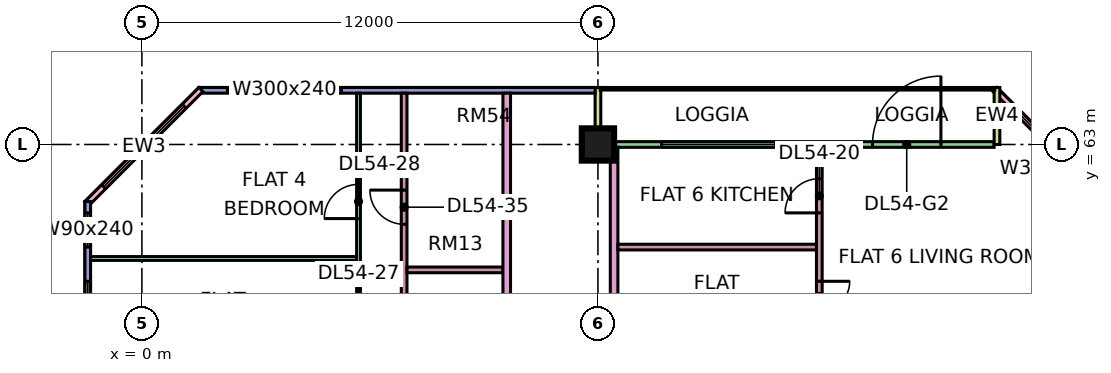
"""IFC4 building model, lengths in metres.
Left out: names, types, materials, properties, quantities, classifications, styles, units other than length and angle.
Written with IfcOpenShell. Run it as: python <this file> out.ifc"""

import sys

from ifc_helpers import new_model, si_unit, direction, frame, frame_2d, origin, origin_2d, place, context, subcontext, project, spatial, rectangle, extrude, element, fill, save


model = new_model("IFC4")
c1 = context("Model", 3, precision=1e-05, world=origin(), true_north=direction((0.0, 1.0)))
c2 = subcontext(c1, "Body", "Model", "MODEL_VIEW")
j1 = project(units=[si_unit("LENGTHUNIT", "METRE"), si_unit("PLANEANGLEUNIT", "RADIAN")], contexts=[c1])
p1 = place(None, origin())
s1 = spatial("IfcSite", under=j1, at=p1, CompositionType="ELEMENT")
p2 = place(p1, origin())
s2 = spatial("IfcBuilding", under=s1, at=p2, CompositionType="ELEMENT")
p3 = place(p2, frame((0.0, 0.0, 230.4)))
s3 = spatial("IfcBuildingStorey", under=s2, at=p3, CompositionType="ELEMENT", Elevation=230.4)
p4 = place(p3, frame((12.0, 63.0, 0.0), z_axis=(0.0, 0.0, 1.0), x_axis=(1.0, 0.0, 0.0)))
e1 = element("IfcColumn", 1, at=p4, inside=s3, PredefinedType="COLUMN", context=c2, shape_type="SweptSolid", body=[
    extrude(rectangle(XDim=0.85, YDim=0.85, at=origin_2d()), origin(), (0.0, 0.0, 1.0), 3.75),
])
p5 = place(p3, frame((25.447, 61.447, 0.0), z_axis=(0.0, 0.0, 1.0), x_axis=(-0.707106781187, 0.707106781187, 0.0)))
e2 = element("IfcWall", 2, at=p5, inside=s3, PredefinedType="SOLIDWALL", context=c2, shape_type="SweptSolid", body=[
    extrude(rectangle(XDim=4.243, YDim=0.15, at=frame_2d((2.121, 0.0))), origin(), (0.0, 0.0, 1.0), 3.35),
])
p6 = place(p5, frame((0.621, 0.0, 0.45)))
e3 = element("IfcOpeningElement", 3, at=p6, cuts=e2, PredefinedType="OPENING", context=c2, shape_type="SweptSolid", body=[
    extrude(rectangle(XDim=3.0, YDim=2.4, at=frame_2d((1.5, 1.2))), frame((0.0, 0.085, 0.0), z_axis=(0.0, -1.0, 0.0), x_axis=(1.0, 0.0, 0.0)), (0.0, 0.0, 1.0), 0.17),
])
p7 = place(p3, frame((22.425, 63.0, 0.0), z_axis=(0.0, 0.0, 1.0), x_axis=(-1.0, 0.0, 0.0)))
e4 = element("IfcWall", 4, at=p7, inside=s3, PredefinedType="SOLIDWALL", context=c2, shape_type="SweptSolid", body=[
    extrude(rectangle(XDim=10.35, YDim=0.15, at=frame_2d((5.175, 0.0))), origin(), (0.0, 0.0, 1.0), 3.35),
])
p8 = place(p7, frame((1.4, 0.0, 0.0)))
e5 = element("IfcOpeningElement", 5, at=p8, cuts=e4, PredefinedType="OPENING", context=c2, shape_type="SweptSolid", body=[
    extrude(rectangle(XDim=1.8, YDim=2.4, at=frame_2d((0.9, 1.2))), frame((0.0, 0.085, 0.0), z_axis=(0.0, -1.0, 0.0), x_axis=(1.0, 0.0, 0.0)), (0.0, 0.0, 1.0), 0.17),
])
p9 = place(p7, frame((5.75, 0.0, 0.45)))
e6 = element("IfcOpeningElement", 6, at=p9, cuts=e4, PredefinedType="OPENING", context=c2, shape_type="SweptSolid", body=[
    extrude(rectangle(XDim=3.0, YDim=2.4, at=frame_2d((1.5, 1.2))), frame((0.0, 0.085, 0.0), z_axis=(0.0, -1.0, 0.0), x_axis=(1.0, 0.0, 0.0)), (0.0, 0.0, 1.0), 0.17),
])
for number, where, z_axis, x_axis in (
    (7, (22.5, 64.5, 0.0), (0.0, 0.0, 1.0), (0.0, -1.0, 0.0)),
    (8, (12.0, 64.5, 0.0), (0.0, 0.0, 1.0), (0.0, -1.0, 0.0)),
):
    element("IfcWall", number, at=place(p3, frame(where, z_axis=z_axis, x_axis=x_axis)), inside=s3, PredefinedType="SOLIDWALL", context=c2, shape_type="SweptSolid", body=[
        extrude(rectangle(XDim=1.5, YDim=0.15, at=frame_2d((0.75, 0.0))), origin(), (0.0, 0.0, 1.0), 3.35),
    ])
p10 = place(p3, frame((11.925, 64.425, 0.0), z_axis=(0.0, 0.0, 1.0), x_axis=(-1.0, 0.0, 0.0)))
e9 = element("IfcWall", 9, at=p10, inside=s3, PredefinedType="SOLIDWALL", context=c2, shape_type="SweptSolid", body=[
    extrude(rectangle(XDim=10.425, YDim=0.15, at=frame_2d((5.212, 0.0))), origin(), (0.0, 0.0, 1.0), 3.35),
])
p11 = place(p10, frame((6.675, 0.0, 0.45)))
e10 = element("IfcOpeningElement", 10, at=p11, cuts=e9, PredefinedType="OPENING", context=c2, shape_type="SweptSolid", body=[
    extrude(rectangle(XDim=3.0, YDim=2.4, at=frame_2d((1.5, 1.2))), frame((0.0, 0.085, 0.0), z_axis=(0.0, -1.0, 0.0), x_axis=(1.0, 0.0, 0.0)), (0.0, 0.0, 1.0), 0.17),
])
p12 = place(p3, frame((1.553, 64.447, 0.0), z_axis=(0.0, 0.0, 1.0), x_axis=(-0.707106781187, -0.707106781187, 0.0)))
e11 = element("IfcWall", 11, at=p12, inside=s3, PredefinedType="SOLIDWALL", context=c2, shape_type="SweptSolid", body=[
    extrude(rectangle(XDim=4.243, YDim=0.15, at=frame_2d((2.121, 0.0))), origin(), (0.0, 0.0, 1.0), 3.35),
])
p13 = place(p12, frame((0.621, 0.0, 0.45)))
e12 = element("IfcOpeningElement", 12, at=p13, cuts=e11, PredefinedType="OPENING", context=c2, shape_type="SweptSolid", body=[
    extrude(rectangle(XDim=3.0, YDim=2.4, at=frame_2d((1.5, 1.2))), frame((0.0, 0.085, 0.0), z_axis=(0.0, -1.0, 0.0), x_axis=(1.0, 0.0, 0.0)), (0.0, 0.0, 1.0), 0.17),
])
p14 = place(p3, frame((-1.425, 61.5, 0.0), z_axis=(0.0, 0.0, 1.0), x_axis=(0.0, -1.0, 0.0)))
e13 = element("IfcWall", 13, at=p14, inside=s3, PredefinedType="SOLIDWALL", context=c2, shape_type="SweptSolid", body=[
    extrude(rectangle(XDim=13.425, YDim=0.15, at=frame_2d((6.712, 0.0))), origin(), (0.0, 0.0, 1.0), 3.35),
])
p15 = place(p14, frame((0.3, 0.0, 0.45)))
e14 = element("IfcOpeningElement", 14, at=p15, cuts=e13, PredefinedType="OPENING", context=c2, shape_type="SweptSolid", body=[
    extrude(rectangle(XDim=0.9, YDim=2.4, at=frame_2d((0.45, 1.2))), frame((0.0, 0.085, 0.0), z_axis=(0.0, -1.0, 0.0), x_axis=(1.0, 0.0, 0.0)), (0.0, 0.0, 1.0), 0.17),
])
p16 = place(p14, frame((2.1, 0.0, 0.45)))
e15 = element("IfcOpeningElement", 15, at=p16, cuts=e13, PredefinedType="OPENING", context=c2, shape_type="SweptSolid", body=[
    extrude(rectangle(XDim=1.8, YDim=2.4, at=frame_2d((0.9, 1.2))), frame((0.0, 0.085, 0.0), z_axis=(0.0, -1.0, 0.0), x_axis=(1.0, 0.0, 0.0)), (0.0, 0.0, 1.0), 0.17),
])
p17 = place(p14, frame((5.1, 0.0, 0.45)))
e16 = element("IfcOpeningElement", 16, at=p17, cuts=e13, PredefinedType="OPENING", context=c2, shape_type="SweptSolid", body=[
    extrude(rectangle(XDim=1.8, YDim=2.4, at=frame_2d((0.9, 1.2))), frame((0.0, 0.085, 0.0), z_axis=(0.0, -1.0, 0.0), x_axis=(1.0, 0.0, 0.0)), (0.0, 0.0, 1.0), 0.17),
])
p18 = place(p14, frame((8.962, 0.0, 0.45)))
e17 = element("IfcOpeningElement", 17, at=p18, cuts=e13, PredefinedType="OPENING", context=c2, shape_type="SweptSolid", body=[
    extrude(rectangle(XDim=3.0, YDim=2.4, at=frame_2d((1.5, 1.2))), frame((0.0, 0.085, 0.0), z_axis=(0.0, -1.0, 0.0), x_axis=(1.0, 0.0, 0.0)), (0.0, 0.0, 1.0), 0.17),
])
p19 = place(p3, frame((-1.351, 60.0, 0.0), z_axis=(0.0, 0.0, 1.0), x_axis=(1.0, 0.0, 0.0)))
e18 = element("IfcWall", 18, at=p19, inside=s3, PredefinedType="PARTITIONING", context=c2, shape_type="SweptSolid", body=[
    extrude(rectangle(XDim=7.001, YDim=0.1, at=frame_2d((3.5, 0.0))), origin(), (0.0, 0.0, 1.0), 3.35),
])
p20 = place(p3, frame((5.7, 36.1, 0.0), z_axis=(0.0, 0.0, 1.0), x_axis=(0.0, 1.0, 0.0)))
e19 = element("IfcWall", 19, at=p20, inside=s3, PredefinedType="PARTITIONING", context=c2, shape_type="SweptSolid", body=[
    extrude(rectangle(XDim=28.25, YDim=0.1, at=frame_2d((14.125, 0.0))), origin(), (0.0, 0.0, 1.0), 3.35),
])
p21 = place(p20, frame((0.95, 0.0, 0.0)))
e20 = element("IfcOpeningElement", 20, at=p21, cuts=e19, PredefinedType="OPENING", context=c2, shape_type="SweptSolid", body=[
    extrude(rectangle(XDim=0.9, YDim=2.1, at=frame_2d((0.45, 1.05))), frame((0.0, 0.06, 0.0), z_axis=(0.0, -1.0, 0.0), x_axis=(1.0, 0.0, 0.0)), (0.0, 0.0, 1.0), 0.12),
])
p22 = place(p20, frame((3.95, 0.0, 0.0)))
e21 = element("IfcOpeningElement", 21, at=p22, cuts=e19, PredefinedType="OPENING", context=c2, shape_type="SweptSolid", body=[
    extrude(rectangle(XDim=0.9, YDim=2.1, at=frame_2d((0.45, 1.05))), frame((0.0, 0.06, 0.0), z_axis=(0.0, -1.0, 0.0), x_axis=(1.0, 0.0, 0.0)), (0.0, 0.0, 1.0), 0.12),
])
p23 = place(p20, frame((6.95, 0.0, 0.0)))
e22 = element("IfcOpeningElement", 22, at=p23, cuts=e19, PredefinedType="OPENING", context=c2, shape_type="SweptSolid", body=[
    extrude(rectangle(XDim=0.9, YDim=2.1, at=frame_2d((0.45, 1.05))), frame((0.0, 0.06, 0.0), z_axis=(0.0, -1.0, 0.0), x_axis=(1.0, 0.0, 0.0)), (0.0, 0.0, 1.0), 0.12),
])
p24 = place(p20, frame((18.95, 0.0, 0.0)))
e23 = element("IfcOpeningElement", 23, at=p24, cuts=e19, PredefinedType="OPENING", context=c2, shape_type="SweptSolid", body=[
    extrude(rectangle(XDim=0.9, YDim=2.1, at=frame_2d((0.45, 1.05))), frame((0.0, 0.06, 0.0), z_axis=(0.0, -1.0, 0.0), x_axis=(1.0, 0.0, 0.0)), (0.0, 0.0, 1.0), 0.12),
])
p25 = place(p20, frame((21.95, 0.0, 0.0)))
e24 = element("IfcOpeningElement", 24, at=p25, cuts=e19, PredefinedType="OPENING", context=c2, shape_type="SweptSolid", body=[
    extrude(rectangle(XDim=0.9, YDim=2.1, at=frame_2d((0.45, 1.05))), frame((0.0, 0.06, 0.0), z_axis=(0.0, -1.0, 0.0), x_axis=(1.0, 0.0, 0.0)), (0.0, 0.0, 1.0), 0.12),
])
p26 = place(p20, frame((24.95, 0.0, 0.0)))
e25 = element("IfcOpeningElement", 25, at=p26, cuts=e19, PredefinedType="OPENING", context=c2, shape_type="SweptSolid", body=[
    extrude(rectangle(XDim=0.9, YDim=2.1, at=frame_2d((0.45, 1.05))), frame((0.0, 0.06, 0.0), z_axis=(0.0, -1.0, 0.0), x_axis=(1.0, 0.0, 0.0)), (0.0, 0.0, 1.0), 0.12),
])
p27 = place(p20, frame((12.95, 0.0, 0.0)))
e26 = element("IfcOpeningElement", 26, at=p27, cuts=e19, PredefinedType="OPENING", context=c2, shape_type="SweptSolid", body=[
    extrude(rectangle(XDim=0.9, YDim=2.1, at=frame_2d((0.45, 1.05))), frame((0.0, 0.06, 0.0), z_axis=(0.0, -1.0, 0.0), x_axis=(1.0, 0.0, 0.0)), (0.0, 0.0, 1.0), 0.12),
])
p28 = place(p3, frame((6.9, 39.25, 0.0), z_axis=(0.0, 0.0, 1.0), x_axis=(0.0, 1.0, 0.0)))
e27 = element("IfcWall", 27, at=p28, inside=s3, PredefinedType="PARTITIONING", context=c2, shape_type="SweptSolid", body=[
    extrude(rectangle(XDim=25.1, YDim=0.15, at=frame_2d((12.55, 0.0))), origin(), (0.0, 0.0, 1.0), 3.35),
])
p29 = place(p28, frame((9.5, 0.0, 0.0)))
e28 = element("IfcOpeningElement", 28, at=p29, cuts=e27, PredefinedType="OPENING", context=c2, shape_type="SweptSolid", body=[
    extrude(rectangle(XDim=0.8, YDim=2.1, at=frame_2d((0.4, 1.05))), frame((0.0, 0.085, 0.0), z_axis=(0.0, -1.0, 0.0), x_axis=(1.0, 0.0, 0.0)), (0.0, 0.0, 1.0), 0.17),
])
p30 = place(p28, frame((12.65, 0.0, 0.0)))
e29 = element("IfcOpeningElement", 29, at=p30, cuts=e27, PredefinedType="OPENING", context=c2, shape_type="SweptSolid", body=[
    extrude(rectangle(XDim=0.9, YDim=2.1, at=frame_2d((0.45, 1.05))), frame((0.0, 0.085, 0.0), z_axis=(0.0, -1.0, 0.0), x_axis=(1.0, 0.0, 0.0)), (0.0, 0.0, 1.0), 0.17),
])
p31 = place(p28, frame((18.8, 0.0, 0.0)))
e30 = element("IfcOpeningElement", 30, at=p31, cuts=e27, PredefinedType="OPENING", context=c2, shape_type="SweptSolid", body=[
    extrude(rectangle(XDim=0.8, YDim=2.1, at=frame_2d((0.4, 1.05))), frame((0.0, 0.085, 0.0), z_axis=(0.0, -1.0, 0.0), x_axis=(1.0, 0.0, 0.0)), (0.0, 0.0, 1.0), 0.17),
])
p32 = place(p28, frame((6.8, 0.0, 0.0)))
e31 = element("IfcOpeningElement", 31, at=p32, cuts=e27, PredefinedType="OPENING", context=c2, shape_type="SweptSolid", body=[
    extrude(rectangle(XDim=0.9, YDim=2.1, at=frame_2d((0.45, 1.05))), frame((0.0, 0.085, 0.0), z_axis=(0.0, -1.0, 0.0), x_axis=(1.0, 0.0, 0.0)), (0.0, 0.0, 1.0), 0.17),
])
p33 = place(p28, frame((21.65, 0.0, 0.0)))
e32 = element("IfcOpeningElement", 32, at=p33, cuts=e27, PredefinedType="OPENING", context=c2, shape_type="SweptSolid", body=[
    extrude(rectangle(XDim=0.9, YDim=2.1, at=frame_2d((0.45, 1.05))), frame((0.0, 0.085, 0.0), z_axis=(0.0, -1.0, 0.0), x_axis=(1.0, 0.0, 0.0)), (0.0, 0.0, 1.0), 0.17),
])
p34 = place(p28, frame((3.95, 0.0, 0.0)))
e33 = element("IfcOpeningElement", 33, at=p34, cuts=e27, PredefinedType="OPENING", context=c2, shape_type="SweptSolid", body=[
    extrude(rectangle(XDim=0.8, YDim=2.1, at=frame_2d((0.4, 1.05))), frame((0.0, 0.085, 0.0), z_axis=(0.0, -1.0, 0.0), x_axis=(1.0, 0.0, 0.0)), (0.0, 0.0, 1.0), 0.17),
])
p35 = place(p28, frame((15.8, 0.0, 0.0)))
e34 = element("IfcOpeningElement", 34, at=p35, cuts=e27, PredefinedType="OPENING", context=c2, shape_type="SweptSolid", body=[
    extrude(rectangle(XDim=0.8, YDim=2.1, at=frame_2d((0.4, 1.05))), frame((0.0, 0.085, 0.0), z_axis=(0.0, -1.0, 0.0), x_axis=(1.0, 0.0, 0.0)), (0.0, 0.0, 1.0), 0.17),
])
p36 = place(p3, frame((6.975, 59.7, 0.0), z_axis=(0.0, 0.0, 1.0), x_axis=(1.0, 0.0, 0.0)))
e35 = element("IfcWall", 35, at=p36, inside=s3, PredefinedType="PARTITIONING", context=c2, shape_type="SweptSolid", body=[
    extrude(rectangle(XDim=2.525, YDim=0.15, at=frame_2d((1.262, 0.0))), origin(), (0.0, 0.0, 1.0), 3.35),
])
p37 = place(p3, frame((9.6, 20.0, 0.0), z_axis=(0.0, 0.0, 1.0), x_axis=(0.0, 1.0, 0.0)))
e36 = element("IfcWall", 36, at=p37, inside=s3, PredefinedType="PARTITIONING", context=c2, shape_type="SweptSolid", body=[
    extrude(rectangle(XDim=44.35, YDim=0.2, at=frame_2d((22.175, 0.0))), origin(), (0.0, 0.0, 1.0), 3.35),
])
p38 = place(p37, frame((17.1, 0.0, 0.0)))
e37 = element("IfcOpeningElement", 37, at=p38, cuts=e36, PredefinedType="OPENING", context=c2, shape_type="SweptSolid", body=[
    extrude(rectangle(XDim=1.0, YDim=2.1, at=frame_2d((0.5, 1.05))), frame((0.0, 0.11, 0.0), z_axis=(0.0, -1.0, 0.0), x_axis=(1.0, 0.0, 0.0)), (0.0, 0.0, 1.0), 0.22),
])
p39 = place(p37, frame((0.6, 0.0, 0.0)))
e38 = element("IfcOpeningElement", 38, at=p39, cuts=e36, PredefinedType="OPENING", context=c2, shape_type="SweptSolid", body=[
    extrude(rectangle(XDim=1.2, YDim=2.1, at=frame_2d((0.6, 1.05))), frame((0.0, 0.11, 0.0), z_axis=(0.0, -1.0, 0.0), x_axis=(1.0, 0.0, 0.0)), (0.0, 0.0, 1.0), 0.22),
])
p40 = place(p37, frame((3.9, 0.0, 0.0)))
e39 = element("IfcOpeningElement", 39, at=p40, cuts=e36, PredefinedType="OPENING", context=c2, shape_type="SweptSolid", body=[
    extrude(rectangle(XDim=1.0, YDim=2.1, at=frame_2d((0.5, 1.05))), frame((0.0, 0.11, 0.0), z_axis=(0.0, -1.0, 0.0), x_axis=(1.0, 0.0, 0.0)), (0.0, 0.0, 1.0), 0.22),
])
p41 = place(p3, frame((12.425, 20.0, 0.0), z_axis=(0.0, 0.0, 1.0), x_axis=(0.0, 1.0, 0.0)))
e40 = element("IfcWall", 40, at=p41, inside=s3, PredefinedType="PARTITIONING", context=c2, shape_type="SweptSolid", body=[
    extrude(rectangle(XDim=42.926, YDim=0.2, at=frame_2d((21.463, 0.0))), origin(), (0.0, 0.0, 1.0), 3.35),
])
p42 = place(p41, frame((6.7, 0.0, 0.0)))
e41 = element("IfcOpeningElement", 41, at=p42, cuts=e40, PredefinedType="OPENING", context=c2, shape_type="SweptSolid", body=[
    extrude(rectangle(XDim=1.6, YDim=2.1, at=frame_2d((0.8, 1.05))), frame((0.0, 0.11, 0.0), z_axis=(0.0, -1.0, 0.0), x_axis=(1.0, 0.0, 0.0)), (0.0, 0.0, 1.0), 0.22),
])
p43 = place(p41, frame((12.95, 0.0, 0.0)))
e42 = element("IfcOpeningElement", 42, at=p43, cuts=e40, PredefinedType="OPENING", context=c2, shape_type="SweptSolid", body=[
    extrude(rectangle(XDim=1.0, YDim=2.1, at=frame_2d((0.5, 1.05))), frame((0.0, 0.11, 0.0), z_axis=(0.0, -1.0, 0.0), x_axis=(1.0, 0.0, 0.0)), (0.0, 0.0, 1.0), 0.22),
])
p44 = place(p41, frame((23.2, 0.0, 0.0)))
e43 = element("IfcOpeningElement", 43, at=p44, cuts=e40, PredefinedType="OPENING", context=c2, shape_type="SweptSolid", body=[
    extrude(rectangle(XDim=1.0, YDim=2.1, at=frame_2d((0.5, 1.05))), frame((0.0, 0.11, 0.0), z_axis=(0.0, -1.0, 0.0), x_axis=(1.0, 0.0, 0.0)), (0.0, 0.0, 1.0), 0.22),
])
p45 = place(p41, frame((35.35, 0.0, 0.0)))
e44 = element("IfcOpeningElement", 44, at=p45, cuts=e40, PredefinedType="OPENING", context=c2, shape_type="SweptSolid", body=[
    extrude(rectangle(XDim=1.0, YDim=2.1, at=frame_2d((0.5, 1.05))), frame((0.0, 0.11, 0.0), z_axis=(0.0, -1.0, 0.0), x_axis=(1.0, 0.0, 0.0)), (0.0, 0.0, 1.0), 0.22),
])
p46 = place(p41, frame((1.15, 0.0, 0.0)))
e45 = element("IfcOpeningElement", 45, at=p46, cuts=e40, PredefinedType="OPENING", context=c2, shape_type="SweptSolid", body=[
    extrude(rectangle(XDim=1.8, YDim=2.1, at=frame_2d((0.9, 1.05))), frame((0.0, 0.11, 0.0), z_axis=(0.0, -1.0, 0.0), x_axis=(1.0, 0.0, 0.0)), (0.0, 0.0, 1.0), 0.22),
])
p47 = place(p41, frame((28.6, 0.0, 0.0)))
e46 = element("IfcOpeningElement", 46, at=p47, cuts=e40, PredefinedType="OPENING", context=c2, shape_type="SweptSolid", body=[
    extrude(rectangle(XDim=1.8, YDim=2.1, at=frame_2d((0.9, 1.05))), frame((0.0, 0.11, 0.0), z_axis=(0.0, -1.0, 0.0), x_axis=(1.0, 0.0, 0.0)), (0.0, 0.0, 1.0), 0.22),
])
p48 = place(p3, frame((12.525, 60.3, 0.0), z_axis=(0.0, 0.0, 1.0), x_axis=(1.0, 0.0, 0.0)))
e47 = element("IfcWall", 47, at=p48, inside=s3, PredefinedType="PARTITIONING", context=c2, shape_type="SweptSolid", body=[
    extrude(rectangle(XDim=5.225, YDim=0.15, at=frame_2d((2.613, 0.0))), origin(), (0.0, 0.0, 1.0), 3.35),
])
p49 = place(p3, frame((17.825, 57.675, 0.0), z_axis=(0.0, 0.0, 1.0), x_axis=(0.0, 1.0, 0.0)))
e48 = element("IfcWall", 48, at=p49, inside=s3, PredefinedType="PARTITIONING", context=c2, shape_type="SweptSolid", body=[
    extrude(rectangle(XDim=5.251, YDim=0.15, at=frame_2d((2.625, 0.0))), origin(), (0.0, 0.0, 1.0), 3.35),
])
p50 = place(p49, frame((0.925, 0.0, 0.0)))
e49 = element("IfcOpeningElement", 49, at=p50, cuts=e48, PredefinedType="OPENING", context=c2, shape_type="SweptSolid", body=[
    extrude(rectangle(XDim=0.8, YDim=2.1, at=frame_2d((0.4, 1.05))), frame((0.0, 0.085, 0.0), z_axis=(0.0, -1.0, 0.0), x_axis=(1.0, 0.0, 0.0)), (0.0, 0.0, 1.0), 0.17),
])
p51 = place(p49, frame((3.525, 0.0, 0.0)))
e50 = element("IfcOpeningElement", 50, at=p51, cuts=e48, PredefinedType="OPENING", context=c2, shape_type="SweptSolid", body=[
    extrude(rectangle(XDim=0.9, YDim=2.1, at=frame_2d((0.45, 1.05))), frame((0.0, 0.085, 0.0), z_axis=(0.0, -1.0, 0.0), x_axis=(1.0, 0.0, 0.0)), (0.0, 0.0, 1.0), 0.17),
])
p52 = place(p6, origin())
e51 = element("IfcWindow", 51, at=p52, inside=s3, PartitioningType="SINGLE_PANEL", PredefinedType="WINDOW", context=c2, shape_type="SweptSolid", body=[
    extrude(rectangle(XDim=3.0, YDim=2.4, at=frame_2d((1.5, 1.2))), frame((0.0, 0.03, 0.0), z_axis=(0.0, -1.0, 0.0), x_axis=(1.0, 0.0, 0.0)), (0.0, 0.0, 1.0), 0.06),
])
fill(e3, e51)
p53 = place(p8, frame((1.8, 0.0, 0.0), z_axis=(0.0, 0.0, 1.0), x_axis=(-1.0, 0.0, 0.0)))
e52 = element("IfcDoor", 52, at=p53, inside=s3, OperationType="DOUBLE_DOOR_SINGLE_SWING", PredefinedType="DOOR", context=c2, shape_type="SweptSolid", body=[
    extrude(rectangle(XDim=1.8, YDim=2.4, at=frame_2d((0.9, 1.2))), frame((0.0, 0.025, 0.0), z_axis=(0.0, -1.0, 0.0), x_axis=(1.0, 0.0, 0.0)), (0.0, 0.0, 1.0), 0.05),
])
fill(e5, e52)
p54 = place(p9, origin())
e53 = element("IfcWindow", 53, at=p54, inside=s3, PartitioningType="SINGLE_PANEL", PredefinedType="WINDOW", context=c2, shape_type="SweptSolid", body=[
    extrude(rectangle(XDim=3.0, YDim=2.4, at=frame_2d((1.5, 1.2))), frame((0.0, 0.03, 0.0), z_axis=(0.0, -1.0, 0.0), x_axis=(1.0, 0.0, 0.0)), (0.0, 0.0, 1.0), 0.06),
])
fill(e6, e53)
p55 = place(p11, origin())
e54 = element("IfcWindow", 54, at=p55, inside=s3, PartitioningType="SINGLE_PANEL", PredefinedType="WINDOW", context=c2, shape_type="SweptSolid", body=[
    extrude(rectangle(XDim=3.0, YDim=2.4, at=frame_2d((1.5, 1.2))), frame((0.0, 0.03, 0.0), z_axis=(0.0, -1.0, 0.0), x_axis=(1.0, 0.0, 0.0)), (0.0, 0.0, 1.0), 0.06),
])
fill(e10, e54)
p56 = place(p13, origin())
e55 = element("IfcWindow", 55, at=p56, inside=s3, PartitioningType="SINGLE_PANEL", PredefinedType="WINDOW", context=c2, shape_type="SweptSolid", body=[
    extrude(rectangle(XDim=3.0, YDim=2.4, at=frame_2d((1.5, 1.2))), frame((0.0, 0.03, 0.0), z_axis=(0.0, -1.0, 0.0), x_axis=(1.0, 0.0, 0.0)), (0.0, 0.0, 1.0), 0.06),
])
fill(e12, e55)
p57 = place(p15, origin())
e56 = element("IfcWindow", 56, at=p57, inside=s3, PartitioningType="SINGLE_PANEL", PredefinedType="WINDOW", context=c2, shape_type="SweptSolid", body=[
    extrude(rectangle(XDim=0.9, YDim=2.4, at=frame_2d((0.45, 1.2))), frame((0.0, 0.03, 0.0), z_axis=(0.0, -1.0, 0.0), x_axis=(1.0, 0.0, 0.0)), (0.0, 0.0, 1.0), 0.06),
])
fill(e14, e56)
p58 = place(p16, origin())
e57 = element("IfcWindow", 57, at=p58, inside=s3, PartitioningType="SINGLE_PANEL", PredefinedType="WINDOW", context=c2, shape_type="SweptSolid", body=[
    extrude(rectangle(XDim=1.8, YDim=2.4, at=frame_2d((0.9, 1.2))), frame((0.0, 0.03, 0.0), z_axis=(0.0, -1.0, 0.0), x_axis=(1.0, 0.0, 0.0)), (0.0, 0.0, 1.0), 0.06),
])
fill(e15, e57)
p59 = place(p50, origin())
e58 = element("IfcDoor", 58, at=p59, inside=s3, OperationType="SINGLE_SWING_RIGHT", PredefinedType="DOOR", context=c2, shape_type="SweptSolid", body=[
    extrude(rectangle(XDim=0.8, YDim=2.1, at=frame_2d((0.4, 1.05))), frame((0.0, 0.025, 0.0), z_axis=(0.0, -1.0, 0.0), x_axis=(1.0, 0.0, 0.0)), (0.0, 0.0, 1.0), 0.05),
])
fill(e49, e58)
p60 = place(p51, origin())
e59 = element("IfcDoor", 59, at=p60, inside=s3, OperationType="SINGLE_SWING_LEFT", PredefinedType="DOOR", context=c2, shape_type="SweptSolid", body=[
    extrude(rectangle(XDim=0.9, YDim=2.1, at=frame_2d((0.45, 1.05))), frame((0.0, 0.025, 0.0), z_axis=(0.0, -1.0, 0.0), x_axis=(1.0, 0.0, 0.0)), (0.0, 0.0, 1.0), 0.05),
])
fill(e50, e59)
p61 = place(p26, origin())
e60 = element("IfcDoor", 60, at=p61, inside=s3, OperationType="SINGLE_SWING_LEFT", PredefinedType="DOOR", context=c2, shape_type="SweptSolid", body=[
    extrude(rectangle(XDim=0.9, YDim=2.1, at=frame_2d((0.45, 1.05))), frame((0.0, 0.025, 0.0), z_axis=(0.0, -1.0, 0.0), x_axis=(1.0, 0.0, 0.0)), (0.0, 0.0, 1.0), 0.05),
])
fill(e25, e60)
p62 = place(p33, frame((0.9, 0.0, 0.0), z_axis=(0.0, 0.0, 1.0), x_axis=(-1.0, 0.0, 0.0)))
e61 = element("IfcDoor", 61, at=p62, inside=s3, OperationType="SINGLE_SWING_RIGHT", PredefinedType="DOOR", context=c2, shape_type="SweptSolid", body=[
    extrude(rectangle(XDim=0.9, YDim=2.1, at=frame_2d((0.45, 1.05))), frame((0.0, 0.025, 0.0), z_axis=(0.0, -1.0, 0.0), x_axis=(1.0, 0.0, 0.0)), (0.0, 0.0, 1.0), 0.05),
])
fill(e32, e61)
save(model, sys.argv[1])
